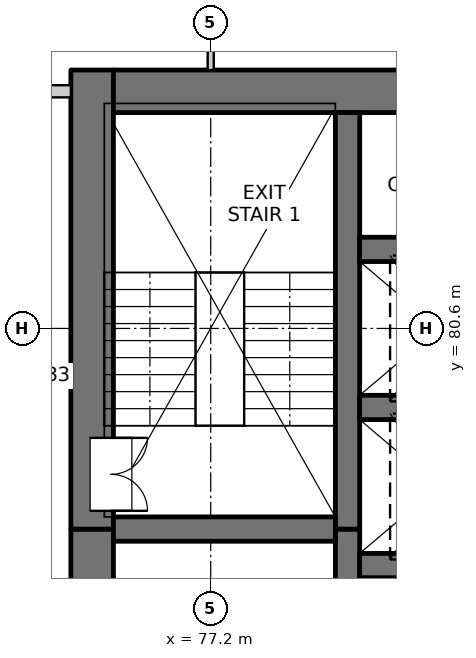
"""IFC4 building model, lengths in metres.
Left out: names, types, materials, properties, quantities, classifications, styles, units other than length and angle.
Written with IfcOpenShell. Run it as: python <this file> out.ifc"""

import sys

from ifc_helpers import new_model, si_unit, direction, frame, frame_2d, origin, place, context, subcontext, project, spatial, rectangle, extrude, element, fill, save


model = new_model("IFC4")
c1 = context("Model", 3, precision=1e-05, world=origin(), true_north=direction((0.0, 1.0)))
c2 = subcontext(c1, "Body", "Model", "MODEL_VIEW")
j1 = project(units=[si_unit("LENGTHUNIT", "METRE"), si_unit("PLANEANGLEUNIT", "RADIAN")], contexts=[c1])
p1 = place(None, origin())
s1 = spatial("IfcSite", under=j1, at=p1, CompositionType="ELEMENT")
p2 = place(p1, origin())
s2 = spatial("IfcBuilding", under=s1, at=p2, CompositionType="ELEMENT")
p3 = place(p2, frame((0.0, 0.0, 19.5)))
s3 = spatial("IfcBuildingStorey", under=s2, at=p3, CompositionType="ELEMENT", Elevation=19.5)
p4 = place(p3, frame((75.25, 54.9, -0.25), z_axis=(0.0, 0.0, 1.0), x_axis=(0.0, 1.0, 0.0)))
e1 = element("IfcWall", 1, at=p4, inside=s3, PredefinedType="SOLIDWALL", context=c2, shape_type="SweptSolid", body=[
    extrude(rectangle(XDim=22.4, YDim=0.7, at=frame_2d((11.2, 0.0))), origin(), (0.0, 0.0, 1.0), 3.4),
])
p5 = place(p4, frame((7.55, 0.0, 0.25)))
e2 = element("IfcOpeningElement", 2, at=p5, cuts=e1, PredefinedType="OPENING", context=c2, shape_type="SweptSolid", body=[
    extrude(rectangle(XDim=0.9, YDim=2.1, at=frame_2d((0.45, 1.05))), frame((0.0, 0.36, 0.0), z_axis=(0.0, -1.0, 0.0), x_axis=(1.0, 0.0, 0.0)), (0.0, 0.0, 1.0), 0.72),
])
p6 = place(p4, frame((10.85, 0.0, 0.25)))
e3 = element("IfcOpeningElement", 3, at=p6, cuts=e1, PredefinedType="OPENING", context=c2, shape_type="SweptSolid", body=[
    extrude(rectangle(XDim=0.9, YDim=2.1, at=frame_2d((0.45, 1.05))), frame((0.0, 0.36, 0.0), z_axis=(0.0, -1.0, 0.0), x_axis=(1.0, 0.0, 0.0)), (0.0, 0.0, 1.0), 0.72),
])
p7 = place(p4, frame((15.35, 0.0, 0.25)))
e4 = element("IfcOpeningElement", 4, at=p7, cuts=e1, PredefinedType="OPENING", context=c2, shape_type="SweptSolid", body=[
    extrude(rectangle(XDim=0.9, YDim=2.1, at=frame_2d((0.45, 1.05))), frame((0.0, 0.36, 0.0), z_axis=(0.0, -1.0, 0.0), x_axis=(1.0, 0.0, 0.0)), (0.0, 0.0, 1.0), 0.72),
])
p8 = place(p4, frame((20.15, 0.0, 0.25)))
e5 = element("IfcOpeningElement", 5, at=p8, cuts=e1, PredefinedType="OPENING", context=c2, shape_type="SweptSolid", body=[
    extrude(rectangle(XDim=0.9, YDim=2.1, at=frame_2d((0.45, 1.05))), frame((0.0, 0.36, 0.0), z_axis=(0.0, -1.0, 0.0), x_axis=(1.0, 0.0, 0.0)), (0.0, 0.0, 1.0), 0.72),
])
p9 = place(p3, frame((75.25, 77.3, -0.25), z_axis=(0.0, 0.0, 1.0), x_axis=(0.0, 1.0, 0.0)))
e6 = element("IfcWall", 6, at=p9, inside=s3, PredefinedType="SOLIDWALL", context=c2, shape_type="SweptSolid", body=[
    extrude(rectangle(XDim=7.55, YDim=0.7, at=frame_2d((3.775, 0.0))), origin(), (0.0, 0.0, 1.0), 3.4),
])
p10 = place(p9, frame((0.3, 0.0, 0.25)))
e7 = element("IfcOpeningElement", 7, at=p10, cuts=e6, PredefinedType="OPENING", context=c2, shape_type="SweptSolid", body=[
    extrude(rectangle(XDim=1.2, YDim=2.1, at=frame_2d((0.6, 1.05))), frame((0.0, 0.36, 0.0), z_axis=(0.0, -1.0, 0.0), x_axis=(1.0, 0.0, 0.0)), (0.0, 0.0, 1.0), 0.72),
])
p11 = place(p3, frame((75.6, 84.5, -0.25), z_axis=(0.0, 0.0, 1.0), x_axis=(1.0, 0.0, 0.0)))
e8 = element("IfcWall", 8, at=p11, inside=s3, PredefinedType="SOLIDWALL", context=c2, shape_type="SweptSolid", body=[
    extrude(rectangle(XDim=18.8, YDim=0.7, at=frame_2d((9.4, 0.0))), origin(), (0.0, 0.0, 1.0), 3.4),
])
p12 = place(p3, frame((79.45, 60.9, -0.25), z_axis=(0.0, 0.0, 1.0), x_axis=(0.0, 1.0, 0.0)))
e9 = element("IfcWall", 9, at=p12, inside=s3, PredefinedType="SOLIDWALL", context=c2, shape_type="SweptSolid", body=[
    extrude(rectangle(XDim=16.4, YDim=0.4, at=frame_2d((8.2, 0.0))), origin(), (0.0, 0.0, 1.0), 3.4),
])
p13 = place(p3, frame((79.45, 77.3, -0.25), z_axis=(0.0, 0.0, 1.0), x_axis=(0.0, 1.0, 0.0)))
e10 = element("IfcWall", 10, at=p13, inside=s3, PredefinedType="SOLIDWALL", context=c2, shape_type="SweptSolid", body=[
    extrude(rectangle(XDim=6.85, YDim=0.4, at=frame_2d((3.425, 0.0))), origin(), (0.0, 0.0, 1.0), 3.4),
])
for number, where, z_axis, x_axis in (
    (11, (79.65, 76.7, -0.25), (0.0, 0.0, 1.0), (1.0, 0.0, 0.0)),
    (12, (79.65, 79.3, -0.25), (0.0, 0.0, 1.0), (1.0, 0.0, 0.0)),
    (13, (79.65, 81.9, -0.25), (0.0, 0.0, 1.0), (1.0, 0.0, 0.0)),
):
    element("IfcWall", number, at=place(p3, frame(where, z_axis=z_axis, x_axis=x_axis)), inside=s3, PredefinedType="SOLIDWALL", context=c2, shape_type="SweptSolid", body=[
        extrude(rectangle(XDim=3.0, YDim=0.4, at=frame_2d((1.5, 0.0))), origin(), (0.0, 0.0, 1.0), 3.4),
    ])
p14 = place(p3, frame((75.6, 77.3, -0.25), z_axis=(0.0, 0.0, 1.0), x_axis=(1.0, 0.0, 0.0)))
e14 = element("IfcWall", 14, at=p14, inside=s3, PredefinedType="SOLIDWALL", context=c2, shape_type="SweptSolid", body=[
    extrude(rectangle(XDim=3.65, YDim=0.4, at=frame_2d((1.825, 0.0))), origin(), (0.0, 0.0, 1.0), 3.4),
])
p15 = place(p3, frame((73.2, 84.5, 0.0), z_axis=(0.0, 0.0, 1.0), x_axis=(1.0, 0.0, 0.0)))
e15 = element("IfcWall", 15, at=p15, inside=s3, PredefinedType="PARTITIONING", context=c2, shape_type="SweptSolid", body=[
    extrude(rectangle(XDim=1.7, YDim=0.2, at=frame_2d((0.85, 0.0))), origin(), (0.0, 0.0, 1.0), 3.15),
])
p16 = place(p3, frame((77.2, 84.85, 0.0), z_axis=(0.0, 0.0, 1.0), x_axis=(0.0, 1.0, 0.0)))
e16 = element("IfcWall", 16, at=p16, inside=s3, PredefinedType="PARTITIONING", context=c2, shape_type="SweptSolid", body=[
    extrude(rectangle(XDim=3.25, YDim=0.1, at=frame_2d((1.625, 0.0))), origin(), (0.0, 0.0, 1.0), 3.15),
])
p17 = place(p16, frame((1.15, 0.0, 0.0)))
e17 = element("IfcOpeningElement", 17, at=p17, cuts=e16, PredefinedType="OPENING", context=c2, shape_type="SweptSolid", body=[
    extrude(rectangle(XDim=0.9, YDim=2.1, at=frame_2d((0.45, 1.05))), frame((0.0, 0.06, 0.0), z_axis=(0.0, -1.0, 0.0), x_axis=(1.0, 0.0, 0.0)), (0.0, 0.0, 1.0), 0.12),
])
p18 = place(p10, origin())
e18 = element("IfcDoor", 18, at=p18, inside=s3, OperationType="DOUBLE_DOOR_SINGLE_SWING", PredefinedType="DOOR", context=c2, shape_type="SweptSolid", body=[
    extrude(rectangle(XDim=1.2, YDim=2.1, at=frame_2d((0.6, 1.05))), frame((0.0, -0.285, 0.0), z_axis=(0.0, -1.0, 0.0), x_axis=(1.0, 0.0, 0.0)), (0.0, 0.0, 1.0), 0.05),
])
fill(e7, e18)
save(model, sys.argv[1])
